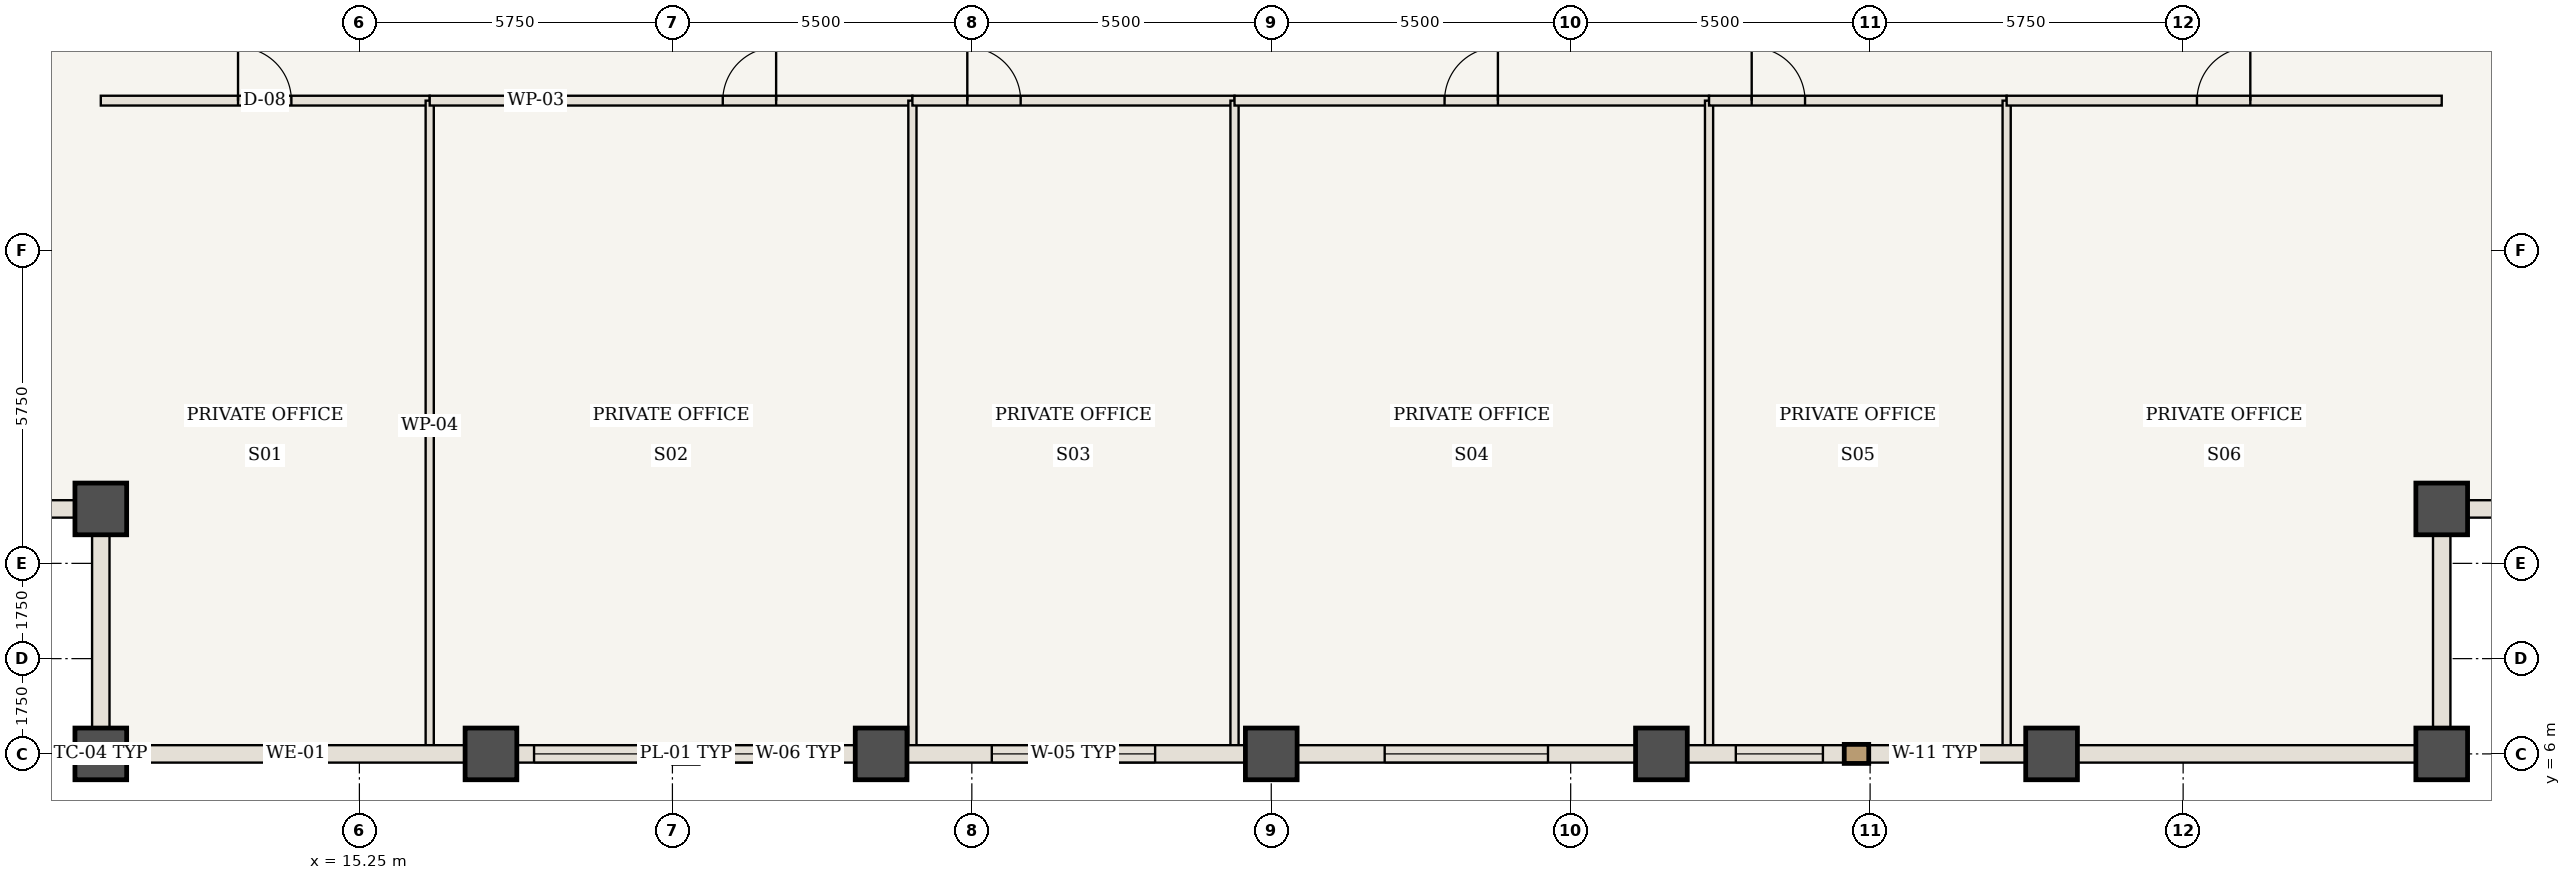
"""IFC4 building model, lengths in metres.
Left out: names, types, materials, properties, quantities, classifications, styles, units other than length and angle.
Written with IfcOpenShell. Run it as: python <this file> out.ifc"""

import sys

from ifc_helpers import new_model, si_unit, direction, frame, frame_2d, origin, origin_2d, place, context, subcontext, project, spatial, rectangle, extrude, element, fill, save


model = new_model("IFC4")
c1 = context("Model", 3, precision=1e-05, world=origin(), true_north=direction((0.0, 1.0)))
c2 = subcontext(c1, "Body", "Model", "MODEL_VIEW")
j1 = project(units=[si_unit("LENGTHUNIT", "METRE"), si_unit("PLANEANGLEUNIT", "RADIAN")], contexts=[c1])
p1 = place(None, origin())
s1 = spatial("IfcSite", under=j1, at=p1, CompositionType="ELEMENT")
p2 = place(p1, origin())
s2 = spatial("IfcBuilding", under=s1, at=p2, CompositionType="ELEMENT")
p3 = place(p2, frame((0.0, 0.0, 122.15)))
s3 = spatial("IfcBuildingStorey", under=s2, at=p3, CompositionType="ELEMENT", Elevation=122.15)
for number, where, z_axis, x_axis in (
    (1, (10.5, 6.0, 0.0), (0.0, 0.0, 1.0), (1.0, 0.0, 0.0)),
    (2, (10.5, 10.5, 0.0), (0.0, 0.0, 1.0), (1.0, 0.0, 0.0)),
    (3, (53.5, 6.0, 0.0), (0.0, 0.0, 1.0), (1.0, 0.0, 0.0)),
    (4, (53.5, 10.5, 0.0), (0.0, 0.0, 1.0), (1.0, 0.0, 0.0)),
    (5, (17.667, 6.0, 0.0), (0.0, 0.0, 1.0), (1.0, 0.0, 0.0)),
    (6, (24.833, 6.0, 0.0), (0.0, 0.0, 1.0), (1.0, 0.0, 0.0)),
    (7, (32.0, 6.0, 0.0), (0.0, 0.0, 1.0), (1.0, 0.0, 0.0)),
    (8, (39.167, 6.0, 0.0), (0.0, 0.0, 1.0), (1.0, 0.0, 0.0)),
    (9, (46.333, 6.0, 0.0), (0.0, 0.0, 1.0), (1.0, 0.0, 0.0)),
):
    element("IfcColumn", number, at=place(p3, frame(where, z_axis=z_axis, x_axis=x_axis)), inside=s3, PredefinedType="COLUMN", context=c2, shape_type="SweptSolid", body=[
        extrude(rectangle(XDim=0.95, YDim=0.95, at=origin_2d()), origin(), (0.0, 0.0, 1.0), 3.85),
    ])
p4 = place(p3, frame((10.5, 18.0, 0.0), z_axis=(0.0, 0.0, 1.0), x_axis=(1.0, 0.0, 0.0)))
e10 = element("IfcWall", 10, at=p4, inside=s3, PredefinedType="STANDARD", context=c2, shape_type="SweptSolid", body=[
    extrude(rectangle(XDim=6.042, YDim=0.18, at=frame_2d((3.021, 0.0))), origin(), (0.0, 0.0, 1.0), 3.685),
])
p5 = place(p4, frame((2.521, 0.0, 0.0)))
e11 = element("IfcOpeningElement", 11, at=p5, cuts=e10, PredefinedType="OPENING", context=c2, shape_type="SweptSolid", body=[
    extrude(rectangle(XDim=0.98, YDim=2.2, at=frame_2d((0.49, 1.1))), frame((0.0, 0.1, 0.0), z_axis=(0.0, -1.0, 0.0), x_axis=(1.0, 0.0, 0.0)), (0.0, 0.0, 1.0), 0.2),
])
p6 = place(p3, frame((16.542, 6.06, 0.0), z_axis=(0.0, 0.0, 1.0), x_axis=(0.0, 1.0, 0.0)))
e12 = element("IfcWall", 12, at=p6, inside=s3, PredefinedType="STANDARD", context=c2, shape_type="SweptSolid", body=[
    extrude(rectangle(XDim=11.94, YDim=0.15, at=frame_2d((5.97, 0.0))), origin(), (0.0, 0.0, 1.0), 3.685),
])
p7 = place(p3, frame((16.542, 18.0, 0.0), z_axis=(0.0, 0.0, 1.0), x_axis=(1.0, 0.0, 0.0)))
e13 = element("IfcWall", 13, at=p7, inside=s3, PredefinedType="STANDARD", context=c2, shape_type="SweptSolid", body=[
    extrude(rectangle(XDim=8.866, YDim=0.18, at=frame_2d((4.433, 0.0))), origin(), (0.0, 0.0, 1.0), 3.685),
])
p8 = place(p7, frame((5.383, 0.0, 0.0)))
e14 = element("IfcOpeningElement", 14, at=p8, cuts=e13, PredefinedType="OPENING", context=c2, shape_type="SweptSolid", body=[
    extrude(rectangle(XDim=0.98, YDim=2.2, at=frame_2d((0.49, 1.1))), frame((0.0, 0.1, 0.0), z_axis=(0.0, -1.0, 0.0), x_axis=(1.0, 0.0, 0.0)), (0.0, 0.0, 1.0), 0.2),
])
p9 = place(p3, frame((25.408, 6.06, 0.0), z_axis=(0.0, 0.0, 1.0), x_axis=(0.0, 1.0, 0.0)))
e15 = element("IfcWall", 15, at=p9, inside=s3, PredefinedType="STANDARD", context=c2, shape_type="SweptSolid", body=[
    extrude(rectangle(XDim=11.94, YDim=0.15, at=frame_2d((5.97, 0.0))), origin(), (0.0, 0.0, 1.0), 3.685),
])
p10 = place(p3, frame((25.408, 18.0, 0.0), z_axis=(0.0, 0.0, 1.0), x_axis=(1.0, 0.0, 0.0)))
e16 = element("IfcWall", 16, at=p10, inside=s3, PredefinedType="STANDARD", context=c2, shape_type="SweptSolid", body=[
    extrude(rectangle(XDim=5.917, YDim=0.18, at=frame_2d((2.958, 0.0))), origin(), (0.0, 0.0, 1.0), 3.685),
])
p11 = place(p10, frame((1.008, 0.0, 0.0)))
e17 = element("IfcOpeningElement", 17, at=p11, cuts=e16, PredefinedType="OPENING", context=c2, shape_type="SweptSolid", body=[
    extrude(rectangle(XDim=0.98, YDim=2.2, at=frame_2d((0.49, 1.1))), frame((0.0, 0.1, 0.0), z_axis=(0.0, -1.0, 0.0), x_axis=(1.0, 0.0, 0.0)), (0.0, 0.0, 1.0), 0.2),
])
p12 = place(p3, frame((31.325, 6.06, 0.0), z_axis=(0.0, 0.0, 1.0), x_axis=(0.0, 1.0, 0.0)))
e18 = element("IfcWall", 18, at=p12, inside=s3, PredefinedType="STANDARD", context=c2, shape_type="SweptSolid", body=[
    extrude(rectangle(XDim=11.94, YDim=0.15, at=frame_2d((5.97, 0.0))), origin(), (0.0, 0.0, 1.0), 3.685),
])
p13 = place(p3, frame((31.325, 18.0, 0.0), z_axis=(0.0, 0.0, 1.0), x_axis=(1.0, 0.0, 0.0)))
e19 = element("IfcWall", 19, at=p13, inside=s3, PredefinedType="STANDARD", context=c2, shape_type="SweptSolid", body=[
    extrude(rectangle(XDim=8.717, YDim=0.18, at=frame_2d((4.358, 0.0))), origin(), (0.0, 0.0, 1.0), 3.685),
])
p14 = place(p13, frame((3.858, 0.0, 0.0)))
e20 = element("IfcOpeningElement", 20, at=p14, cuts=e19, PredefinedType="OPENING", context=c2, shape_type="SweptSolid", body=[
    extrude(rectangle(XDim=0.98, YDim=2.2, at=frame_2d((0.49, 1.1))), frame((0.0, 0.1, 0.0), z_axis=(0.0, -1.0, 0.0), x_axis=(1.0, 0.0, 0.0)), (0.0, 0.0, 1.0), 0.2),
])
p15 = place(p3, frame((40.042, 6.06, 0.0), z_axis=(0.0, 0.0, 1.0), x_axis=(0.0, 1.0, 0.0)))
e21 = element("IfcWall", 21, at=p15, inside=s3, PredefinedType="STANDARD", context=c2, shape_type="SweptSolid", body=[
    extrude(rectangle(XDim=11.94, YDim=0.15, at=frame_2d((5.97, 0.0))), origin(), (0.0, 0.0, 1.0), 3.685),
])
p16 = place(p3, frame((40.042, 18.0, 0.0), z_axis=(0.0, 0.0, 1.0), x_axis=(1.0, 0.0, 0.0)))
e22 = element("IfcWall", 22, at=p16, inside=s3, PredefinedType="STANDARD", context=c2, shape_type="SweptSolid", body=[
    extrude(rectangle(XDim=5.467, YDim=0.18, at=frame_2d((2.733, 0.0))), origin(), (0.0, 0.0, 1.0), 3.685),
])
p17 = place(p16, frame((0.783, 0.0, 0.0)))
e23 = element("IfcOpeningElement", 23, at=p17, cuts=e22, PredefinedType="OPENING", context=c2, shape_type="SweptSolid", body=[
    extrude(rectangle(XDim=0.98, YDim=2.2, at=frame_2d((0.49, 1.1))), frame((0.0, 0.1, 0.0), z_axis=(0.0, -1.0, 0.0), x_axis=(1.0, 0.0, 0.0)), (0.0, 0.0, 1.0), 0.2),
])
p18 = place(p3, frame((45.508, 6.06, 0.0), z_axis=(0.0, 0.0, 1.0), x_axis=(0.0, 1.0, 0.0)))
e24 = element("IfcWall", 24, at=p18, inside=s3, PredefinedType="STANDARD", context=c2, shape_type="SweptSolid", body=[
    extrude(rectangle(XDim=11.94, YDim=0.15, at=frame_2d((5.97, 0.0))), origin(), (0.0, 0.0, 1.0), 3.685),
])
p19 = place(p3, frame((45.508, 18.0, 0.0), z_axis=(0.0, 0.0, 1.0), x_axis=(1.0, 0.0, 0.0)))
e25 = element("IfcWall", 25, at=p19, inside=s3, PredefinedType="STANDARD", context=c2, shape_type="SweptSolid", body=[
    extrude(rectangle(XDim=7.992, YDim=0.18, at=frame_2d((3.996, 0.0))), origin(), (0.0, 0.0, 1.0), 3.685),
])
p20 = place(p19, frame((3.496, 0.0, 0.0)))
e26 = element("IfcOpeningElement", 26, at=p20, cuts=e25, PredefinedType="OPENING", context=c2, shape_type="SweptSolid", body=[
    extrude(rectangle(XDim=0.98, YDim=2.2, at=frame_2d((0.49, 1.1))), frame((0.0, 0.1, 0.0), z_axis=(0.0, -1.0, 0.0), x_axis=(1.0, 0.0, 0.0)), (0.0, 0.0, 1.0), 0.2),
])
p21 = place(p3, frame((17.667, 6.0, 0.0), z_axis=(0.0, 0.0, 1.0), x_axis=(-1.0, 0.0, 0.0)))
e27 = element("IfcWall", 27, at=p21, inside=s3, PredefinedType="USERDEFINED", context=c2, shape_type="SweptSolid", body=[
    extrude(rectangle(XDim=7.167, YDim=0.32, at=frame_2d((3.583, 0.0))), origin(), (0.0, 0.0, 1.0), 2.885),
])
p22 = place(p3, frame((24.833, 6.0, 0.0), z_axis=(0.0, 0.0, 1.0), x_axis=(-1.0, 0.0, 0.0)))
e28 = element("IfcWall", 28, at=p22, inside=s3, PredefinedType="USERDEFINED", context=c2, shape_type="SweptSolid", body=[
    extrude(rectangle(XDim=7.167, YDim=0.32, at=frame_2d((3.583, 0.0))), origin(), (0.0, 0.0, 1.0), 2.885),
])
p23 = place(p22, frame((0.792, 0.0, 0.85)))
e29 = element("IfcOpeningElement", 29, at=p23, cuts=e28, PredefinedType="OPENING", context=c2, shape_type="SweptSolid", body=[
    extrude(rectangle(XDim=2.2, YDim=1.835, at=frame_2d((1.1, 0.917))), frame((0.0, 0.17, 0.0), z_axis=(0.0, -1.0, 0.0), x_axis=(1.0, 0.0, 0.0)), (0.0, 0.0, 1.0), 0.34),
])
p24 = place(p22, frame((4.175, 0.0, 0.85)))
e30 = element("IfcOpeningElement", 30, at=p24, cuts=e28, PredefinedType="OPENING", context=c2, shape_type="SweptSolid", body=[
    extrude(rectangle(XDim=2.2, YDim=1.835, at=frame_2d((1.1, 0.917))), frame((0.0, 0.17, 0.0), z_axis=(0.0, -1.0, 0.0), x_axis=(1.0, 0.0, 0.0)), (0.0, 0.0, 1.0), 0.34),
])
p25 = place(p3, frame((32.0, 6.0, 0.0), z_axis=(0.0, 0.0, 1.0), x_axis=(-1.0, 0.0, 0.0)))
e31 = element("IfcWall", 31, at=p25, inside=s3, PredefinedType="USERDEFINED", context=c2, shape_type="SweptSolid", body=[
    extrude(rectangle(XDim=7.167, YDim=0.32, at=frame_2d((3.583, 0.0))), origin(), (0.0, 0.0, 1.0), 2.885),
])
p26 = place(p25, frame((2.133, 0.0, 0.85)))
e32 = element("IfcOpeningElement", 32, at=p26, cuts=e31, PredefinedType="OPENING", context=c2, shape_type="SweptSolid", body=[
    extrude(rectangle(XDim=3.0, YDim=1.835, at=frame_2d((1.5, 0.917))), frame((0.0, 0.17, 0.0), z_axis=(0.0, -1.0, 0.0), x_axis=(1.0, 0.0, 0.0)), (0.0, 0.0, 1.0), 0.34),
])
p27 = place(p3, frame((39.167, 6.0, 0.0), z_axis=(0.0, 0.0, 1.0), x_axis=(-1.0, 0.0, 0.0)))
e33 = element("IfcWall", 33, at=p27, inside=s3, PredefinedType="USERDEFINED", context=c2, shape_type="SweptSolid", body=[
    extrude(rectangle(XDim=7.167, YDim=0.32, at=frame_2d((3.583, 0.0))), origin(), (0.0, 0.0, 1.0), 2.885),
])
p28 = place(p27, frame((2.083, 0.0, 0.85)))
e34 = element("IfcOpeningElement", 34, at=p28, cuts=e33, PredefinedType="OPENING", context=c2, shape_type="SweptSolid", body=[
    extrude(rectangle(XDim=3.0, YDim=1.835, at=frame_2d((1.5, 0.917))), frame((0.0, 0.17, 0.0), z_axis=(0.0, -1.0, 0.0), x_axis=(1.0, 0.0, 0.0)), (0.0, 0.0, 1.0), 0.34),
])
p29 = place(p3, frame((46.333, 6.0, 0.0), z_axis=(0.0, 0.0, 1.0), x_axis=(-1.0, 0.0, 0.0)))
e35 = element("IfcWall", 35, at=p29, inside=s3, PredefinedType="USERDEFINED", context=c2, shape_type="SweptSolid", body=[
    extrude(rectangle(XDim=7.167, YDim=0.32, at=frame_2d((3.583, 0.0))), origin(), (0.0, 0.0, 1.0), 2.885),
])
p30 = place(p29, frame((1.342, 0.0, 0.85)))
e36 = element("IfcOpeningElement", 36, at=p30, cuts=e35, PredefinedType="OPENING", context=c2, shape_type="SweptSolid", body=[
    extrude(rectangle(XDim=1.6, YDim=1.835, at=frame_2d((0.8, 0.917))), frame((0.0, 0.17, 0.0), z_axis=(0.0, -1.0, 0.0), x_axis=(1.0, 0.0, 0.0)), (0.0, 0.0, 1.0), 0.34),
])
p31 = place(p29, frame((4.2, 0.0, 0.85)))
e37 = element("IfcOpeningElement", 37, at=p31, cuts=e35, PredefinedType="OPENING", context=c2, shape_type="SweptSolid", body=[
    extrude(rectangle(XDim=1.6, YDim=1.835, at=frame_2d((0.8, 0.917))), frame((0.0, 0.17, 0.0), z_axis=(0.0, -1.0, 0.0), x_axis=(1.0, 0.0, 0.0)), (0.0, 0.0, 1.0), 0.34),
])
p32 = place(p3, frame((53.5, 6.0, 0.0), z_axis=(0.0, 0.0, 1.0), x_axis=(-1.0, 0.0, 0.0)))
e38 = element("IfcWall", 38, at=p32, inside=s3, PredefinedType="USERDEFINED", context=c2, shape_type="SweptSolid", body=[
    extrude(rectangle(XDim=7.167, YDim=0.32, at=frame_2d((3.583, 0.0))), origin(), (0.0, 0.0, 1.0), 2.885),
])
for number, where, z_axis, x_axis in (
    (39, (10.5, 6.0, 0.0), (0.0, 0.0, 1.0), (0.0, 1.0, 0.0)),
    (40, (10.5, 10.5, 0.0), (0.0, 0.0, 1.0), (-1.0, 0.0, 0.0)),
    (41, (53.5, 10.5, 0.0), (0.0, 0.0, 1.0), (0.0, -1.0, 0.0)),
    (42, (58.0, 10.5, 0.0), (0.0, 0.0, 1.0), (-1.0, 0.0, 0.0)),
):
    element("IfcWall", number, at=place(p3, frame(where, z_axis=z_axis, x_axis=x_axis)), inside=s3, PredefinedType="USERDEFINED", context=c2, shape_type="SweptSolid", body=[
        extrude(rectangle(XDim=4.5, YDim=0.32, at=frame_2d((2.25, 0.0))), origin(), (0.0, 0.0, 1.0), 2.885),
    ])
p33 = place(p5, origin())
e43 = element("IfcDoor", 43, at=p33, inside=s3, OperationType="SINGLE_SWING_LEFT", PredefinedType="DOOR", context=c2, shape_type="SweptSolid", body=[
    extrude(rectangle(XDim=0.98, YDim=2.2, at=frame_2d((0.49, 1.1))), frame((0.0, 0.025, 0.0), z_axis=(0.0, -1.0, 0.0), x_axis=(1.0, 0.0, 0.0)), (0.0, 0.0, 1.0), 0.05),
])
fill(e11, e43)
p34 = place(p8, origin())
e44 = element("IfcDoor", 44, at=p34, inside=s3, OperationType="SINGLE_SWING_RIGHT", PredefinedType="DOOR", context=c2, shape_type="SweptSolid", body=[
    extrude(rectangle(XDim=0.98, YDim=2.2, at=frame_2d((0.49, 1.1))), frame((0.0, 0.025, 0.0), z_axis=(0.0, -1.0, 0.0), x_axis=(1.0, 0.0, 0.0)), (0.0, 0.0, 1.0), 0.05),
])
fill(e14, e44)
p35 = place(p11, origin())
e45 = element("IfcDoor", 45, at=p35, inside=s3, OperationType="SINGLE_SWING_LEFT", PredefinedType="DOOR", context=c2, shape_type="SweptSolid", body=[
    extrude(rectangle(XDim=0.98, YDim=2.2, at=frame_2d((0.49, 1.1))), frame((0.0, 0.025, 0.0), z_axis=(0.0, -1.0, 0.0), x_axis=(1.0, 0.0, 0.0)), (0.0, 0.0, 1.0), 0.05),
])
fill(e17, e45)
p36 = place(p14, origin())
e46 = element("IfcDoor", 46, at=p36, inside=s3, OperationType="SINGLE_SWING_RIGHT", PredefinedType="DOOR", context=c2, shape_type="SweptSolid", body=[
    extrude(rectangle(XDim=0.98, YDim=2.2, at=frame_2d((0.49, 1.1))), frame((0.0, 0.025, 0.0), z_axis=(0.0, -1.0, 0.0), x_axis=(1.0, 0.0, 0.0)), (0.0, 0.0, 1.0), 0.05),
])
fill(e20, e46)
p37 = place(p17, origin())
e47 = element("IfcDoor", 47, at=p37, inside=s3, OperationType="SINGLE_SWING_LEFT", PredefinedType="DOOR", context=c2, shape_type="SweptSolid", body=[
    extrude(rectangle(XDim=0.98, YDim=2.2, at=frame_2d((0.49, 1.1))), frame((0.0, 0.025, 0.0), z_axis=(0.0, -1.0, 0.0), x_axis=(1.0, 0.0, 0.0)), (0.0, 0.0, 1.0), 0.05),
])
fill(e23, e47)
p38 = place(p20, origin())
e48 = element("IfcDoor", 48, at=p38, inside=s3, OperationType="SINGLE_SWING_RIGHT", PredefinedType="DOOR", context=c2, shape_type="SweptSolid", body=[
    extrude(rectangle(XDim=0.98, YDim=2.2, at=frame_2d((0.49, 1.1))), frame((0.0, 0.025, 0.0), z_axis=(0.0, -1.0, 0.0), x_axis=(1.0, 0.0, 0.0)), (0.0, 0.0, 1.0), 0.05),
])
fill(e26, e48)
p39 = place(p23, origin())
e49 = element("IfcWindow", 49, at=p39, inside=s3, PartitioningType="SINGLE_PANEL", PredefinedType="WINDOW", context=c2, shape_type="SweptSolid", body=[
    extrude(rectangle(XDim=2.2, YDim=1.835, at=frame_2d((1.1, 0.917))), frame((0.0, 0.03, 0.0), z_axis=(0.0, -1.0, 0.0), x_axis=(1.0, 0.0, 0.0)), (0.0, 0.0, 1.0), 0.06),
])
fill(e29, e49)
p40 = place(p24, origin())
e50 = element("IfcWindow", 50, at=p40, inside=s3, PartitioningType="SINGLE_PANEL", PredefinedType="WINDOW", context=c2, shape_type="SweptSolid", body=[
    extrude(rectangle(XDim=2.2, YDim=1.835, at=frame_2d((1.1, 0.917))), frame((0.0, 0.03, 0.0), z_axis=(0.0, -1.0, 0.0), x_axis=(1.0, 0.0, 0.0)), (0.0, 0.0, 1.0), 0.06),
])
fill(e30, e50)
p41 = place(p26, origin())
e51 = element("IfcWindow", 51, at=p41, inside=s3, PartitioningType="SINGLE_PANEL", PredefinedType="WINDOW", context=c2, shape_type="SweptSolid", body=[
    extrude(rectangle(XDim=3.0, YDim=1.835, at=frame_2d((1.5, 0.917))), frame((0.0, 0.03, 0.0), z_axis=(0.0, -1.0, 0.0), x_axis=(1.0, 0.0, 0.0)), (0.0, 0.0, 1.0), 0.06),
])
fill(e32, e51)
p42 = place(p28, origin())
e52 = element("IfcWindow", 52, at=p42, inside=s3, PartitioningType="SINGLE_PANEL", PredefinedType="WINDOW", context=c2, shape_type="SweptSolid", body=[
    extrude(rectangle(XDim=3.0, YDim=1.835, at=frame_2d((1.5, 0.917))), frame((0.0, 0.03, 0.0), z_axis=(0.0, -1.0, 0.0), x_axis=(1.0, 0.0, 0.0)), (0.0, 0.0, 1.0), 0.06),
])
fill(e34, e52)
p43 = place(p30, origin())
e53 = element("IfcWindow", 53, at=p43, inside=s3, PartitioningType="SINGLE_PANEL", PredefinedType="WINDOW", context=c2, shape_type="SweptSolid", body=[
    extrude(rectangle(XDim=1.6, YDim=1.835, at=frame_2d((0.8, 0.917))), frame((0.0, 0.03, 0.0), z_axis=(0.0, -1.0, 0.0), x_axis=(1.0, 0.0, 0.0)), (0.0, 0.0, 1.0), 0.06),
])
fill(e36, e53)
p44 = place(p31, origin())
e54 = element("IfcWindow", 54, at=p44, inside=s3, PartitioningType="SINGLE_PANEL", PredefinedType="WINDOW", context=c2, shape_type="SweptSolid", body=[
    extrude(rectangle(XDim=1.6, YDim=1.835, at=frame_2d((0.8, 0.917))), frame((0.0, 0.03, 0.0), z_axis=(0.0, -1.0, 0.0), x_axis=(1.0, 0.0, 0.0)), (0.0, 0.0, 1.0), 0.06),
])
fill(e37, e54)
save(model, sys.argv[1])
